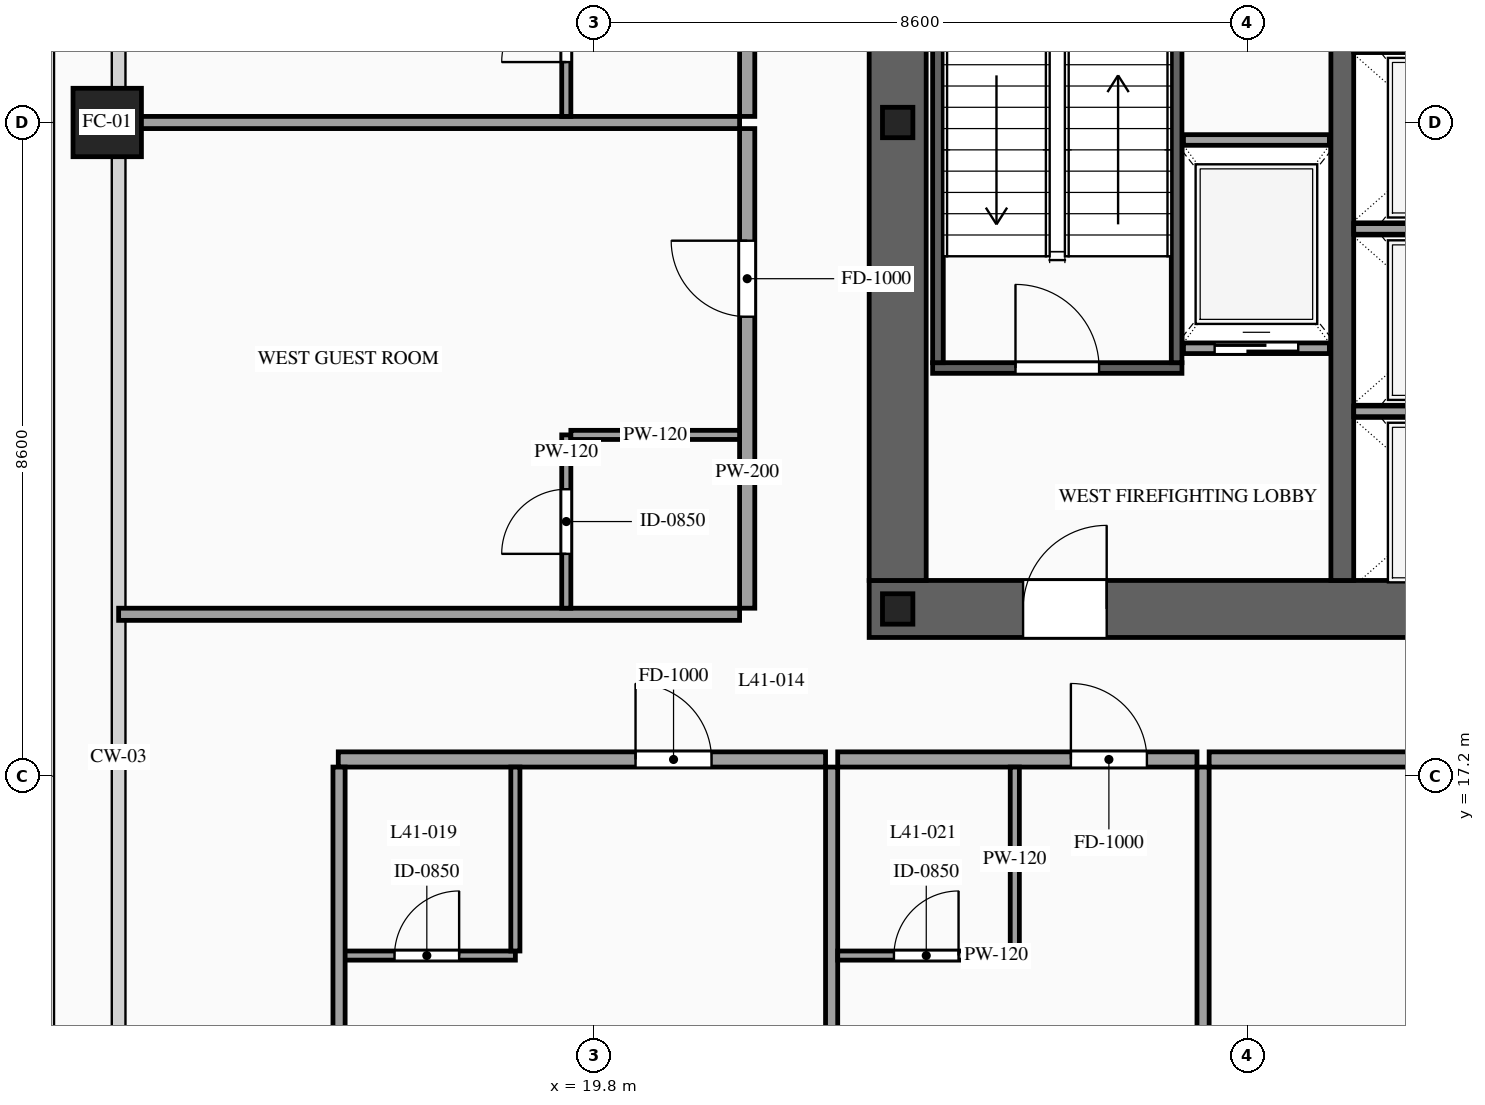
"""IFC4 building model, lengths in metres.
Left out: names, types, materials, properties, quantities, classifications, styles, units other than length and angle.
Written with IfcOpenShell. Run it as: python <this file> out.ifc"""

import sys

from ifc_helpers import new_model, si_unit, direction, frame, frame_2d, origin, origin_2d, place, context, subcontext, project, spatial, rectangle, hollow_rectangle, i_section, extrude, source, transform, mapped, element, fill, save


model = new_model("IFC4")
c1 = context("Model", 3, precision=1e-05, world=origin(), true_north=direction((0.0, 1.0)))
c2 = subcontext(c1, "Body", "Model", "MODEL_VIEW")
j1 = project(units=[si_unit("LENGTHUNIT", "METRE"), si_unit("PLANEANGLEUNIT", "RADIAN")], contexts=[c1])
p1 = place(None, origin())
s1 = spatial("IfcSite", under=j1, at=p1, CompositionType="ELEMENT")
p2 = place(p1, origin())
s2 = spatial("IfcBuilding", under=s1, at=p2, CompositionType="ELEMENT")
p3 = place(p2, frame((0.0, 0.0, 156.0)))
s3 = spatial("IfcBuildingStorey", under=s2, at=p3, CompositionType="ELEMENT", Elevation=156.0)
p4 = place(p3, frame((23.425, 19.4, 0.0), z_axis=(0.0, 0.0, 1.0), x_axis=(1.0, 0.0, 0.0)))
e1 = element("IfcWall", 1, at=p4, inside=s3, PredefinedType="SHEAR", context=c2, shape_type="SweptSolid", body=[
    extrude(rectangle(XDim=27.15, YDim=0.75, at=frame_2d((13.575, 0.0))), origin(), (0.0, 0.0, 1.0), 3.6),
])
p5 = place(p4, frame((2.025, 0.0, 0.0)))
e2 = element("IfcOpeningElement", 2, at=p5, cuts=e1, PredefinedType="OPENING", context=c2, shape_type="SweptSolid", body=[
    extrude(rectangle(XDim=1.1, YDim=2.2, at=frame_2d((0.55, 1.1))), frame((0.0, 0.39, 0.0), z_axis=(0.0, -1.0, 0.0), x_axis=(1.0, 0.0, 0.0)), (0.0, 0.0, 1.0), 0.78),
])
p6 = place(p4, frame((9.925, 0.0, 0.0)))
e3 = element("IfcOpeningElement", 3, at=p6, cuts=e1, PredefinedType="OPENING", context=c2, shape_type="SweptSolid", body=[
    extrude(rectangle(XDim=1.1, YDim=2.2, at=frame_2d((0.55, 1.1))), frame((0.0, 0.39, 0.0), z_axis=(0.0, -1.0, 0.0), x_axis=(1.0, 0.0, 0.0)), (0.0, 0.0, 1.0), 0.78),
])
p7 = place(p4, frame((23.125, 0.0, 0.0)))
e4 = element("IfcOpeningElement", 4, at=p7, cuts=e1, PredefinedType="OPENING", context=c2, shape_type="SweptSolid", body=[
    extrude(rectangle(XDim=1.1, YDim=2.2, at=frame_2d((0.55, 1.1))), frame((0.0, 0.39, 0.0), z_axis=(0.0, -1.0, 0.0), x_axis=(1.0, 0.0, 0.0)), (0.0, 0.0, 1.0), 0.78),
])
p8 = place(p4, frame((19.745, 0.0, 0.0)))
e5 = element("IfcOpeningElement", 5, at=p8, cuts=e1, PredefinedType="OPENING", context=c2, shape_type="SweptSolid", body=[
    extrude(rectangle(XDim=0.9, YDim=2.15, at=frame_2d((0.45, 1.075))), frame((0.0, 0.39, 0.0), z_axis=(0.0, -1.0, 0.0), x_axis=(1.0, 0.0, 0.0)), (0.0, 0.0, 1.0), 0.78),
])
p9 = place(p4, frame((18.305, 0.0, 0.0)))
e6 = element("IfcOpeningElement", 6, at=p9, cuts=e1, PredefinedType="OPENING", context=c2, shape_type="SweptSolid", body=[
    extrude(rectangle(XDim=0.9, YDim=2.15, at=frame_2d((0.45, 1.075))), frame((0.0, 0.39, 0.0), z_axis=(0.0, -1.0, 0.0), x_axis=(1.0, 0.0, 0.0)), (0.0, 0.0, 1.0), 0.78),
])
m1 = source(origin(), c2, "Body", "SweptSolid", [
    extrude(rectangle(XDim=12.05, YDim=0.75, at=frame_2d((6.025, 0.0))), origin(), (0.0, 0.0, 1.0), 3.6),
])
p10 = place(p3, frame((23.8, 19.775, 0.0), z_axis=(0.0, 0.0, 1.0), x_axis=(0.0, 1.0, 0.0)))
e7 = element("IfcWall", 7, at=p10, inside=s3, PredefinedType="SHEAR", context=c2, shape_type="MappedRepresentation", body=[
    mapped(m1, transform((0.0, 0.0, 0.0), scale=1.0)),
])
m2 = source(origin(), c2, "Body", "SweptSolid", [
    extrude(rectangle(XDim=12.05, YDim=0.3, at=frame_2d((6.025, 0.0))), origin(), (0.0, 0.0, 1.0), 3.6),
])
p11 = place(p3, frame((29.65, 19.775, 0.0), z_axis=(0.0, 0.0, 1.0), x_axis=(0.0, 1.0, 0.0)))
e8 = element("IfcWall", 8, at=p11, inside=s3, PredefinedType="SOLIDWALL", context=c2, shape_type="MappedRepresentation", body=[
    mapped(m2, transform((0.0, 0.0, 0.0), scale=1.0)),
])
m3 = source(origin(), c2, "Body", "SweptSolid", [
    extrude(i_section(OverallWidth=0.4, OverallDepth=0.4, WebThickness=0.013, FlangeThickness=0.021, at=origin_2d()), origin(), (0.0, 0.0, 1.0), 3.6),
])
for number, where, z_axis, x_axis in (
    (9, (23.8, 19.4, 0.0), (0.0, 0.0, 1.0), (1.0, 0.0, 0.0)),
    (10, (23.8, 25.8, 0.0), (0.0, 0.0, 1.0), (1.0, 0.0, 0.0)),
):
    element("IfcColumn", number, at=place(p3, frame(where, z_axis=z_axis, x_axis=x_axis)), inside=s3, PredefinedType="COLUMN", context=c2, shape_type="MappedRepresentation", body=[
        mapped(m3, transform((0.0, 0.0, 0.0), scale=1.0)),
    ])
m4 = source(origin(), c2, "Body", "SweptSolid", [
    extrude(hollow_rectangle(XDim=0.9, YDim=0.9, WallThickness=0.042, at=origin_2d()), origin(), (0.0, 0.0, 1.0), 3.6),
])
p12 = place(p3, frame((13.4, 25.8, 0.0), z_axis=(0.0, 0.0, 1.0), x_axis=(1.0, 0.0, 0.0)))
e11 = element("IfcColumn", 11, at=p12, inside=s3, PredefinedType="COLUMN", context=c2, shape_type="MappedRepresentation", body=[
    mapped(m4, transform((0.0, 0.0, 0.0), scale=1.0)),
])
p13 = place(p3, frame((27.56, 22.83, 0.0), z_axis=(0.0, 0.0, 1.0), x_axis=(1.0, 0.0, 0.0)))
e12 = element("IfcWall", 12, at=p13, inside=s3, PredefinedType="SOLIDWALL", context=c2, shape_type="SweptSolid", body=[
    extrude(rectangle(XDim=1.92, YDim=0.14, at=frame_2d((0.96, 0.0))), origin(), (0.0, 0.0, 1.0), 3.38),
])
p14 = place(p13, frame((0.41, 0.0, 0.0)))
e13 = element("IfcOpeningElement", 13, at=p14, cuts=e12, PredefinedType="OPENING", context=c2, shape_type="SweptSolid", body=[
    extrude(rectangle(XDim=1.1, YDim=2.2, at=frame_2d((0.55, 1.1))), frame((0.0, 0.085, 0.0), z_axis=(0.0, -1.0, 0.0), x_axis=(1.0, 0.0, 0.0)), (0.0, 0.0, 1.0), 0.17),
])
m5 = source(origin(), c2, "Body", "SweptSolid", [
    extrude(rectangle(XDim=1.92, YDim=0.14, at=frame_2d((0.96, 0.0))), origin(), (0.0, 0.0, 1.0), 3.38),
])
p15 = place(p3, frame((27.56, 25.57, 0.0), z_axis=(0.0, 0.0, 1.0), x_axis=(1.0, 0.0, 0.0)))
e14 = element("IfcWall", 14, at=p15, inside=s3, PredefinedType="SOLIDWALL", context=c2, shape_type="MappedRepresentation", body=[
    mapped(m5, transform((0.0, 0.0, 0.0), scale=1.0)),
])
m6 = source(origin(), c2, "Body", "SweptSolid", [
    extrude(rectangle(XDim=2.5, YDim=0.14, at=frame_2d((1.25, 0.0))), origin(), (0.0, 0.0, 1.0), 3.38),
])
for number, where, z_axis, x_axis in (
    (15, (29.8, 22.0, 0.0), (0.0, 0.0, 1.0), (1.0, 0.0, 0.0)),
    (16, (29.8, 24.4, 0.0), (0.0, 0.0, 1.0), (1.0, 0.0, 0.0)),
):
    element("IfcWall", number, at=place(p3, frame(where, z_axis=z_axis, x_axis=x_axis)), inside=s3, PredefinedType="SOLIDWALL", context=c2, shape_type="MappedRepresentation", body=[
        mapped(m6, transform((0.0, 0.0, 0.0), scale=1.0)),
    ])
p16 = place(p3, frame((24.26, 22.57, 0.0), z_axis=(0.0, 0.0, 1.0), x_axis=(1.0, 0.0, 0.0)))
e17 = element("IfcWall", 17, at=p16, inside=s3, PredefinedType="SOLIDWALL", context=c2, shape_type="SweptSolid", body=[
    extrude(rectangle(XDim=3.28, YDim=0.14, at=frame_2d((1.64, 0.0))), origin(), (0.0, 0.0, 1.0), 3.38),
])
p17 = place(p16, frame((1.09, 0.0, 0.0)))
e18 = element("IfcOpeningElement", 18, at=p17, cuts=e17, PredefinedType="OPENING", context=c2, shape_type="SweptSolid", body=[
    extrude(rectangle(XDim=1.1, YDim=2.2, at=frame_2d((0.55, 1.1))), frame((0.0, 0.085, 0.0), z_axis=(0.0, -1.0, 0.0), x_axis=(1.0, 0.0, 0.0)), (0.0, 0.0, 1.0), 0.17),
])
m7 = source(origin(), c2, "Body", "SweptSolid", [
    extrude(rectangle(XDim=8.94, YDim=0.14, at=frame_2d((4.47, 0.0))), origin(), (0.0, 0.0, 1.0), 3.38),
])
for number, where, z_axis, x_axis in (
    (19, (24.33, 22.64, 0.0), (0.0, 0.0, 1.0), (0.0, 1.0, 0.0)),
    (20, (27.47, 22.64, 0.0), (0.0, 0.0, 1.0), (0.0, 1.0, 0.0)),
):
    element("IfcWall", number, at=place(p3, frame(where, z_axis=z_axis, x_axis=x_axis)), inside=s3, PredefinedType="SOLIDWALL", context=c2, shape_type="MappedRepresentation", body=[
        mapped(m7, transform((0.0, 0.0, 0.0), scale=1.0)),
    ])
p18 = place(p3, frame((16.44, 17.42, 0.0), z_axis=(0.0, 0.0, 1.0), x_axis=(1.0, 0.0, 0.0)))
e21 = element("IfcWall", 21, at=p18, inside=s3, PredefinedType="PARTITIONING", context=c2, shape_type="SweptSolid", body=[
    extrude(rectangle(XDim=6.411, YDim=0.2, at=frame_2d((3.206, 0.0))), origin(), (0.0, 0.0, 1.0), 3.38),
])
p19 = place(p18, frame((3.911, 0.0, 0.0)))
e22 = element("IfcOpeningElement", 22, at=p19, cuts=e21, PredefinedType="OPENING", context=c2, shape_type="SweptSolid", body=[
    extrude(rectangle(XDim=1.0, YDim=2.2, at=frame_2d((0.5, 1.1))), frame((0.0, 0.115, 0.0), z_axis=(0.0, -1.0, 0.0), x_axis=(1.0, 0.0, 0.0)), (0.0, 0.0, 1.0), 0.23),
])
m8 = source(origin(), c2, "Body", "SweptSolid", [
    extrude(rectangle(XDim=14.97, YDim=0.16, at=frame_2d((7.485, 0.0))), origin(), (0.0, 0.0, 1.0), 3.38),
])
p20 = place(p3, frame((22.931, 2.35, 0.0), z_axis=(0.0, 0.0, 1.0), x_axis=(0.0, 1.0, 0.0)))
e23 = element("IfcWall", 23, at=p20, inside=s3, PredefinedType="PARTITIONING", context=c2, shape_type="MappedRepresentation", body=[
    mapped(m8, transform((0.0, 0.0, 0.0), scale=1.0)),
])
p21 = place(p3, frame((16.44, 14.84, 0.0), z_axis=(0.0, 0.0, 1.0), x_axis=(1.0, 0.0, 0.0)))
e24 = element("IfcWall", 24, at=p21, inside=s3, PredefinedType="PARTITIONING", context=c2, shape_type="SweptSolid", body=[
    extrude(rectangle(XDim=2.33, YDim=0.12, at=frame_2d((1.165, 0.0))), origin(), (0.0, 0.0, 1.0), 3.38),
])
p22 = place(p21, frame((0.74, 0.0, 0.0)))
e25 = element("IfcOpeningElement", 25, at=p22, cuts=e24, PredefinedType="OPENING", context=c2, shape_type="SweptSolid", body=[
    extrude(rectangle(XDim=0.85, YDim=2.1, at=frame_2d((0.425, 1.05))), frame((0.0, 0.075, 0.0), z_axis=(0.0, -1.0, 0.0), x_axis=(1.0, 0.0, 0.0)), (0.0, 0.0, 1.0), 0.15),
])
m9 = source(origin(), c2, "Body", "SweptSolid", [
    extrude(rectangle(XDim=2.42, YDim=0.12, at=frame_2d((1.21, 0.0))), origin(), (0.0, 0.0, 1.0), 3.38),
])
p23 = place(p3, frame((18.77, 14.9, 0.0), z_axis=(0.0, 0.0, 1.0), x_axis=(0.0, 1.0, 0.0)))
e26 = element("IfcWall", 26, at=p23, inside=s3, PredefinedType="PARTITIONING", context=c2, shape_type="MappedRepresentation", body=[
    mapped(m9, transform((0.0, 0.0, 0.0), scale=1.0)),
])
p24 = place(p3, frame((23.011, 17.42, 0.0), z_axis=(0.0, 0.0, 1.0), x_axis=(1.0, 0.0, 0.0)))
e27 = element("IfcWall", 27, at=p24, inside=s3, PredefinedType="PARTITIONING", context=c2, shape_type="SweptSolid", body=[
    extrude(rectangle(XDim=4.727, YDim=0.2, at=frame_2d((2.364, 0.0))), origin(), (0.0, 0.0, 1.0), 3.38),
])
p25 = place(p24, frame((3.068, 0.0, 0.0)))
e28 = element("IfcOpeningElement", 28, at=p25, cuts=e27, PredefinedType="OPENING", context=c2, shape_type="SweptSolid", body=[
    extrude(rectangle(XDim=1.0, YDim=2.2, at=frame_2d((0.5, 1.1))), frame((0.0, 0.115, 0.0), z_axis=(0.0, -1.0, 0.0), x_axis=(1.0, 0.0, 0.0)), (0.0, 0.0, 1.0), 0.23),
])
p26 = place(p3, frame((27.818, 2.35, 0.0), z_axis=(0.0, 0.0, 1.0), x_axis=(0.0, 1.0, 0.0)))
e29 = element("IfcWall", 29, at=p26, inside=s3, PredefinedType="PARTITIONING", context=c2, shape_type="MappedRepresentation", body=[
    mapped(m8, transform((0.0, 0.0, 0.0), scale=1.0)),
])
p27 = place(p3, frame((23.011, 14.84, 0.0), z_axis=(0.0, 0.0, 1.0), x_axis=(1.0, 0.0, 0.0)))
e30 = element("IfcWall", 30, at=p27, inside=s3, PredefinedType="PARTITIONING", context=c2, shape_type="SweptSolid", body=[
    extrude(rectangle(XDim=2.33, YDim=0.12, at=frame_2d((1.165, 0.0))), origin(), (0.0, 0.0, 1.0), 3.38),
])
p28 = place(p27, frame((0.74, 0.0, 0.0)))
e31 = element("IfcOpeningElement", 31, at=p28, cuts=e30, PredefinedType="OPENING", context=c2, shape_type="SweptSolid", body=[
    extrude(rectangle(XDim=0.85, YDim=2.1, at=frame_2d((0.425, 1.05))), frame((0.0, 0.075, 0.0), z_axis=(0.0, -1.0, 0.0), x_axis=(1.0, 0.0, 0.0)), (0.0, 0.0, 1.0), 0.15),
])
p29 = place(p3, frame((25.341, 14.9, 0.0), z_axis=(0.0, 0.0, 1.0), x_axis=(0.0, 1.0, 0.0)))
e32 = element("IfcWall", 32, at=p29, inside=s3, PredefinedType="PARTITIONING", context=c2, shape_type="MappedRepresentation", body=[
    mapped(m9, transform((0.0, 0.0, 0.0), scale=1.0)),
])
p30 = place(p3, frame((27.898, 17.42, 0.0), z_axis=(0.0, 0.0, 1.0), x_axis=(1.0, 0.0, 0.0)))
e33 = element("IfcWall", 33, at=p30, inside=s3, PredefinedType="PARTITIONING", context=c2, shape_type="SweptSolid", body=[
    extrude(rectangle(XDim=6.702, YDim=0.2, at=frame_2d((3.351, 0.0))), origin(), (0.0, 0.0, 1.0), 3.38),
])
p31 = place(p30, frame((2.851, 0.0, 0.0)))
e34 = element("IfcOpeningElement", 34, at=p31, cuts=e33, PredefinedType="OPENING", context=c2, shape_type="SweptSolid", body=[
    extrude(rectangle(XDim=1.0, YDim=2.2, at=frame_2d((0.5, 1.1))), frame((0.0, 0.115, 0.0), z_axis=(0.0, -1.0, 0.0), x_axis=(1.0, 0.0, 0.0)), (0.0, 0.0, 1.0), 0.23),
])
m10 = source(origin(), c2, "Body", "SweptSolid", [
    extrude(rectangle(XDim=14.82, YDim=0.16, at=frame_2d((7.41, 0.0))), origin(), (0.0, 0.0, 1.0), 3.38),
])
p32 = place(p3, frame((16.45, 2.5, 0.0), z_axis=(0.0, 0.0, 1.0), x_axis=(0.0, 1.0, 0.0)))
e35 = element("IfcWall", 35, at=p32, inside=s3, PredefinedType="PARTITIONING", context=c2, shape_type="MappedRepresentation", body=[
    mapped(m10, transform((0.0, 0.0, 0.0), scale=1.0)),
])
p33 = place(p3, frame((21.82, 19.41, 0.0), z_axis=(0.0, 0.0, 1.0), x_axis=(0.0, 1.0, 0.0)))
e36 = element("IfcWall", 36, at=p33, inside=s3, PredefinedType="PARTITIONING", context=c2, shape_type="SweptSolid", body=[
    extrude(rectangle(XDim=6.31, YDim=0.2, at=frame_2d((3.155, 0.0))), origin(), (0.0, 0.0, 1.0), 3.38),
])
p34 = place(p33, frame((3.835, 0.0, 0.0)))
e37 = element("IfcOpeningElement", 37, at=p34, cuts=e36, PredefinedType="OPENING", context=c2, shape_type="SweptSolid", body=[
    extrude(rectangle(XDim=1.0, YDim=2.2, at=frame_2d((0.5, 1.1))), frame((0.0, 0.115, 0.0), z_axis=(0.0, -1.0, 0.0), x_axis=(1.0, 0.0, 0.0)), (0.0, 0.0, 1.0), 0.23),
])
m11 = source(origin(), c2, "Body", "SweptSolid", [
    extrude(rectangle(XDim=8.17, YDim=0.16, at=frame_2d((4.085, 0.0))), origin(), (0.0, 0.0, 1.0), 2.675),
])
p35 = place(p3, frame((13.55, 25.8, 0.0), z_axis=(0.0, 0.0, 1.0), x_axis=(1.0, 0.0, 0.0)))
e38 = element("IfcWall", 38, at=p35, inside=s3, PredefinedType="PARTITIONING", context=c2, shape_type="MappedRepresentation", body=[
    mapped(m11, transform((0.0, 0.0, 0.0), scale=1.0)),
])
m12 = source(origin(), c2, "Body", "SweptSolid", [
    extrude(rectangle(XDim=8.17, YDim=0.16, at=frame_2d((4.085, 0.0))), origin(), (0.0, 0.0, 1.0), 2.875),
])
p36 = place(p3, frame((13.55, 19.33, 0.0), z_axis=(0.0, 0.0, 1.0), x_axis=(1.0, 0.0, 0.0)))
e39 = element("IfcWall", 39, at=p36, inside=s3, PredefinedType="PARTITIONING", context=c2, shape_type="MappedRepresentation", body=[
    mapped(m12, transform((0.0, 0.0, 0.0), scale=1.0)),
])
p37 = place(p3, frame((19.44, 19.41, 0.0), z_axis=(0.0, 0.0, 1.0), x_axis=(0.0, 1.0, 0.0)))
e40 = element("IfcWall", 40, at=p37, inside=s3, PredefinedType="PARTITIONING", context=c2, shape_type="SweptSolid", body=[
    extrude(rectangle(XDim=2.28, YDim=0.12, at=frame_2d((1.14, 0.0))), origin(), (0.0, 0.0, 1.0), 3.38),
])
p38 = place(p37, frame((0.715, 0.0, 0.0)))
e41 = element("IfcOpeningElement", 41, at=p38, cuts=e40, PredefinedType="OPENING", context=c2, shape_type="SweptSolid", body=[
    extrude(rectangle(XDim=0.85, YDim=2.1, at=frame_2d((0.425, 1.05))), frame((0.0, 0.075, 0.0), z_axis=(0.0, -1.0, 0.0), x_axis=(1.0, 0.0, 0.0)), (0.0, 0.0, 1.0), 0.15),
])
m13 = source(origin(), c2, "Body", "SweptSolid", [
    extrude(rectangle(XDim=2.22, YDim=0.12, at=frame_2d((1.11, 0.0))), origin(), (0.0, 0.0, 1.0), 3.38),
])
p39 = place(p3, frame((19.5, 21.69, 0.0), z_axis=(0.0, 0.0, 1.0), x_axis=(1.0, 0.0, 0.0)))
e42 = element("IfcWall", 42, at=p39, inside=s3, PredefinedType="PARTITIONING", context=c2, shape_type="MappedRepresentation", body=[
    mapped(m13, transform((0.0, 0.0, 0.0), scale=1.0)),
])
p40 = place(p3, frame((21.82, 25.88, 0.0), z_axis=(0.0, 0.0, 1.0), x_axis=(0.0, 1.0, 0.0)))
e43 = element("IfcWall", 43, at=p40, inside=s3, PredefinedType="PARTITIONING", context=c2, shape_type="SweptSolid", body=[
    extrude(rectangle(XDim=6.31, YDim=0.2, at=frame_2d((3.155, 0.0))), origin(), (0.0, 0.0, 1.0), 3.38),
])
p41 = place(p40, frame((3.835, 0.0, 0.0)))
e44 = element("IfcOpeningElement", 44, at=p41, cuts=e43, PredefinedType="OPENING", context=c2, shape_type="SweptSolid", body=[
    extrude(rectangle(XDim=1.0, YDim=2.2, at=frame_2d((0.5, 1.1))), frame((0.0, 0.115, 0.0), z_axis=(0.0, -1.0, 0.0), x_axis=(1.0, 0.0, 0.0)), (0.0, 0.0, 1.0), 0.23),
])
p42 = place(p3, frame((19.44, 25.88, 0.0), z_axis=(0.0, 0.0, 1.0), x_axis=(0.0, 1.0, 0.0)))
e45 = element("IfcWall", 45, at=p42, inside=s3, PredefinedType="PARTITIONING", context=c2, shape_type="SweptSolid", body=[
    extrude(rectangle(XDim=2.28, YDim=0.12, at=frame_2d((1.14, 0.0))), origin(), (0.0, 0.0, 1.0), 3.38),
])
p43 = place(p42, frame((0.715, 0.0, 0.0)))
e46 = element("IfcOpeningElement", 46, at=p43, cuts=e45, PredefinedType="OPENING", context=c2, shape_type="SweptSolid", body=[
    extrude(rectangle(XDim=0.85, YDim=2.1, at=frame_2d((0.425, 1.05))), frame((0.0, 0.075, 0.0), z_axis=(0.0, -1.0, 0.0), x_axis=(1.0, 0.0, 0.0)), (0.0, 0.0, 1.0), 0.15),
])
m14 = source(origin(), c2, "Body", "SweptSolid", [
    extrude(rectangle(XDim=1.1, YDim=2.2, at=frame_2d((0.55, 1.1))), frame((0.0, 0.025, 0.0), z_axis=(0.0, -1.0, 0.0), x_axis=(1.0, 0.0, 0.0)), (0.0, 0.0, 1.0), 0.05),
])
p44 = place(p14, origin())
e47 = element("IfcDoor", 47, at=p44, inside=s3, OperationType="SLIDING_TO_LEFT", PredefinedType="DOOR", context=c2, shape_type="MappedRepresentation", body=[
    mapped(m14, transform((0.0, 0.0, 0.0), scale=1.0)),
])
fill(e13, e47)
m15 = source(origin(), c2, "Body", "SweptSolid", [
    extrude(rectangle(XDim=1.1, YDim=2.2, at=frame_2d((0.55, 1.1))), frame((0.0, 0.025, 0.0), z_axis=(0.0, -1.0, 0.0), x_axis=(1.0, 0.0, 0.0)), (0.0, 0.0, 1.0), 0.05),
])
p45 = place(p17, origin())
e48 = element("IfcDoor", 48, at=p45, inside=s3, OperationType="SINGLE_SWING_LEFT", PredefinedType="DOOR", context=c2, shape_type="MappedRepresentation", body=[
    mapped(m15, transform((0.0, 0.0, 0.0), scale=1.0)),
])
fill(e18, e48)
p46 = place(p5, origin())
e49 = element("IfcDoor", 49, at=p46, inside=s3, OperationType="SINGLE_SWING_RIGHT", PredefinedType="DOOR", context=c2, shape_type="MappedRepresentation", body=[
    mapped(m15, transform((0.0, 0.0, 0.0), scale=1.0)),
])
fill(e2, e49)
m16 = source(origin(), c2, "Body", "SweptSolid", [
    extrude(rectangle(XDim=1.0, YDim=2.2, at=frame_2d((0.5, 1.1))), frame((0.0, 0.025, 0.0), z_axis=(0.0, -1.0, 0.0), x_axis=(1.0, 0.0, 0.0)), (0.0, 0.0, 1.0), 0.05),
])
p47 = place(p19, origin())
e50 = element("IfcDoor", 50, at=p47, inside=s3, OperationType="SINGLE_SWING_LEFT", PredefinedType="DOOR", context=c2, shape_type="MappedRepresentation", body=[
    mapped(m16, transform((0.0, 0.0, 0.0), scale=1.0)),
])
fill(e22, e50)
m17 = source(origin(), c2, "Body", "SweptSolid", [
    extrude(rectangle(XDim=0.85, YDim=2.1, at=frame_2d((0.425, 1.05))), frame((0.0, 0.025, 0.0), z_axis=(0.0, -1.0, 0.0), x_axis=(1.0, 0.0, 0.0)), (0.0, 0.0, 1.0), 0.05),
])
p48 = place(p22, origin())
e51 = element("IfcDoor", 51, at=p48, inside=s3, OperationType="SINGLE_SWING_RIGHT", PredefinedType="DOOR", context=c2, shape_type="MappedRepresentation", body=[
    mapped(m17, transform((0.0, 0.0, 0.0), scale=1.0)),
])
fill(e25, e51)
p49 = place(p25, origin())
e52 = element("IfcDoor", 52, at=p49, inside=s3, OperationType="SINGLE_SWING_LEFT", PredefinedType="DOOR", context=c2, shape_type="MappedRepresentation", body=[
    mapped(m16, transform((0.0, 0.0, 0.0), scale=1.0)),
])
fill(e28, e52)
p50 = place(p28, origin())
e53 = element("IfcDoor", 53, at=p50, inside=s3, OperationType="SINGLE_SWING_RIGHT", PredefinedType="DOOR", context=c2, shape_type="MappedRepresentation", body=[
    mapped(m17, transform((0.0, 0.0, 0.0), scale=1.0)),
])
fill(e31, e53)
p51 = place(p34, origin())
e54 = element("IfcDoor", 54, at=p51, inside=s3, OperationType="SINGLE_SWING_RIGHT", PredefinedType="DOOR", context=c2, shape_type="MappedRepresentation", body=[
    mapped(m16, transform((0.0, 0.0, 0.0), scale=1.0)),
])
fill(e37, e54)
p52 = place(p38, origin())
e55 = element("IfcDoor", 55, at=p52, inside=s3, OperationType="SINGLE_SWING_LEFT", PredefinedType="DOOR", context=c2, shape_type="MappedRepresentation", body=[
    mapped(m17, transform((0.0, 0.0, 0.0), scale=1.0)),
])
fill(e41, e55)
p53 = place(p43, origin())
e56 = element("IfcDoor", 56, at=p53, inside=s3, OperationType="SINGLE_SWING_LEFT", PredefinedType="DOOR", context=c2, shape_type="MappedRepresentation", body=[
    mapped(m17, transform((0.0, 0.0, 0.0), scale=1.0)),
])
fill(e46, e56)
save(model, sys.argv[1])
